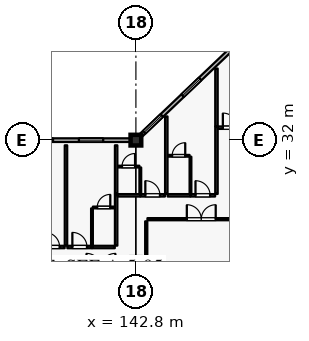
"""IFC4 building model, lengths in metres.
Left out: names, types, materials, properties, quantities, classifications, styles, units other than length and angle.
Written with IfcOpenShell. Run it as: python <this file> out.ifc"""

import sys

from ifc_helpers import new_model, si_unit, direction, frame, frame_2d, origin, origin_2d, place, context, subcontext, project, spatial, rectangle, extrude, element, fill, save


model = new_model("IFC4")
c1 = context("Model", 3, precision=1e-05, world=origin(), true_north=direction((0.0, 1.0)))
c2 = subcontext(c1, "Body", "Model", "MODEL_VIEW")
j1 = project(units=[si_unit("LENGTHUNIT", "METRE"), si_unit("PLANEANGLEUNIT", "RADIAN")], contexts=[c1])
p1 = place(None, origin())
s1 = spatial("IfcSite", under=j1, at=p1, CompositionType="ELEMENT")
p2 = place(p1, origin())
s2 = spatial("IfcBuilding", under=s1, at=p2, CompositionType="ELEMENT")
p3 = place(p2, frame((0.0, 0.0, 32.4)))
s3 = spatial("IfcBuildingStorey", under=s2, at=p3, CompositionType="ELEMENT", Elevation=32.4)
p4 = place(p3, frame((142.8, 32.0, 0.0), z_axis=(0.0, 0.0, 1.0), x_axis=(1.0, 0.0, 0.0)))
e1 = element("IfcColumn", 1, at=p4, inside=s3, PredefinedType="COLUMN", context=c2, shape_type="SweptSolid", body=[
    extrude(rectangle(XDim=0.7, YDim=0.7, at=origin_2d()), origin(), (0.0, 0.0, 1.0), 3.6),
])
p5 = place(p3, frame((142.8, 24.0, 0.0), z_axis=(0.0, 0.0, 1.0), x_axis=(1.0, 0.0, 0.0)))
e2 = element("IfcColumn", 2, at=p5, inside=s3, PredefinedType="COLUMN", context=c2, shape_type="SweptSolid", body=[
    extrude(rectangle(XDim=0.6, YDim=0.6, at=origin_2d()), origin(), (0.0, 0.0, 1.0), 3.6),
])
p6 = place(p3, frame((134.75, 32.0, 0.0), z_axis=(0.0, 0.0, 1.0), x_axis=(1.0, 0.0, 0.0)))
e3 = element("IfcWall", 3, at=p6, inside=s3, PredefinedType="SOLIDWALL", context=c2, shape_type="SweptSolid", body=[
    extrude(rectangle(XDim=7.7, YDim=0.24, at=frame_2d((3.85, 0.0))), origin(), (0.0, 0.0, 1.0), 2.94),
])
p7 = place(p6, frame((1.0, 0.0, 0.8)))
e4 = element("IfcOpeningElement", 4, at=p7, cuts=e3, PredefinedType="OPENING", context=c2, shape_type="SweptSolid", body=[
    extrude(rectangle(XDim=1.6, YDim=1.6, at=frame_2d((0.8, 0.8))), frame((0.0, 0.13, 0.0), z_axis=(0.0, -1.0, 0.0), x_axis=(1.0, 0.0, 0.0)), (0.0, 0.0, 1.0), 0.26),
])
p8 = place(p6, frame((4.3, 0.0, 0.8)))
e5 = element("IfcOpeningElement", 5, at=p8, cuts=e3, PredefinedType="OPENING", context=c2, shape_type="SweptSolid", body=[
    extrude(rectangle(XDim=1.6, YDim=1.6, at=frame_2d((0.8, 0.8))), frame((0.0, 0.13, 0.0), z_axis=(0.0, -1.0, 0.0), x_axis=(1.0, 0.0, 0.0)), (0.0, 0.0, 1.0), 0.26),
])
p9 = place(p3, frame((143.15, 32.333, 0.0), z_axis=(0.0, 0.0, 1.0), x_axis=(0.724116091282, 0.689678103427, 0.0)))
e6 = element("IfcWall", 6, at=p9, inside=s3, PredefinedType="SOLIDWALL", context=c2, shape_type="SweptSolid", body=[
    extrude(rectangle(XDim=10.634, YDim=0.24, at=frame_2d((5.317, 0.0))), origin(), (0.0, 0.0, 1.0), 2.94),
])
p10 = place(p9, frame((0.27, 0.0, 0.8)))
e7 = element("IfcOpeningElement", 7, at=p10, cuts=e6, PredefinedType="OPENING", context=c2, shape_type="SweptSolid", body=[
    extrude(rectangle(XDim=1.6, YDim=1.6, at=frame_2d((0.8, 0.8))), frame((0.0, 0.13, 0.0), z_axis=(0.0, -1.0, 0.0), x_axis=(1.0, 0.0, 0.0)), (0.0, 0.0, 1.0), 0.26),
])
p11 = place(p9, frame((3.757, 0.0, 0.8)))
e8 = element("IfcOpeningElement", 8, at=p11, cuts=e6, PredefinedType="OPENING", context=c2, shape_type="SweptSolid", body=[
    extrude(rectangle(XDim=1.6, YDim=1.6, at=frame_2d((0.8, 0.8))), frame((0.0, 0.13, 0.0), z_axis=(0.0, -1.0, 0.0), x_axis=(1.0, 0.0, 0.0)), (0.0, 0.0, 1.0), 0.26),
])
p12 = place(p9, frame((8.004, 0.0, 0.8)))
e9 = element("IfcOpeningElement", 9, at=p12, cuts=e6, PredefinedType="OPENING", context=c2, shape_type="SweptSolid", body=[
    extrude(rectangle(XDim=1.6, YDim=1.6, at=frame_2d((0.8, 0.8))), frame((0.0, 0.13, 0.0), z_axis=(0.0, -1.0, 0.0), x_axis=(1.0, 0.0, 0.0)), (0.0, 0.0, 1.0), 0.26),
])
p13 = place(p3, frame((136.49, 24.97, 0.0), z_axis=(0.0, 0.0, 1.0), x_axis=(1.0, 0.0, 0.0)))
e10 = element("IfcWall", 10, at=p13, inside=s3, PredefinedType="PARTITIONING", context=c2, shape_type="SweptSolid", body=[
    extrude(rectangle(XDim=1.62, YDim=0.16, at=frame_2d((0.81, 0.0))), origin(), (0.0, 0.0, 1.0), 3.335),
])
p14 = place(p13, frame((0.33, 0.0, 0.0)))
e11 = element("IfcOpeningElement", 11, at=p14, cuts=e10, PredefinedType="OPENING", context=c2, shape_type="SweptSolid", body=[
    extrude(rectangle(XDim=0.96, YDim=2.2, at=frame_2d((0.48, 1.1))), frame((0.0, 0.09, 0.0), z_axis=(0.0, -1.0, 0.0), x_axis=(1.0, 0.0, 0.0)), (0.0, 0.0, 1.0), 0.18),
])
p15 = place(p3, frame((138.29, 24.97, 0.0), z_axis=(0.0, 0.0, 1.0), x_axis=(1.0, 0.0, 0.0)))
e12 = element("IfcWall", 12, at=p15, inside=s3, PredefinedType="PARTITIONING", context=c2, shape_type="SweptSolid", body=[
    extrude(rectangle(XDim=1.62, YDim=0.16, at=frame_2d((0.81, 0.0))), origin(), (0.0, 0.0, 1.0), 3.335),
])
p16 = place(p15, frame((0.33, 0.0, 0.0)))
e13 = element("IfcOpeningElement", 13, at=p16, cuts=e12, PredefinedType="OPENING", context=c2, shape_type="SweptSolid", body=[
    extrude(rectangle(XDim=0.96, YDim=2.2, at=frame_2d((0.48, 1.1))), frame((0.0, 0.09, 0.0), z_axis=(0.0, -1.0, 0.0), x_axis=(1.0, 0.0, 0.0)), (0.0, 0.0, 1.0), 0.18),
])
p17 = place(p3, frame((139.92, 24.97, 0.0), z_axis=(0.0, 0.0, 1.0), x_axis=(1.0, 0.0, 0.0)))
e14 = element("IfcWall", 14, at=p17, inside=s3, PredefinedType="PARTITIONING", context=c2, shape_type="SweptSolid", body=[
    extrude(rectangle(XDim=1.49, YDim=0.16, at=frame_2d((0.745, 0.0))), origin(), (0.0, 0.0, 1.0), 3.335),
])
p18 = place(p3, frame((139.91, 25.06, 0.0), z_axis=(0.0, 0.0, 1.0), x_axis=(0.0, 1.0, 0.0)))
e15 = element("IfcWall", 15, at=p18, inside=s3, PredefinedType="PARTITIONING", context=c2, shape_type="SweptSolid", body=[
    extrude(rectangle(XDim=2.45, YDim=0.115, at=frame_2d((1.225, 0.0))), origin(), (0.0, 0.0, 1.0), 3.335),
])
p19 = place(p3, frame((139.97, 27.57, 0.0), z_axis=(0.0, 0.0, 1.0), x_axis=(1.0, 0.0, 0.0)))
e16 = element("IfcWall", 16, at=p19, inside=s3, PredefinedType="PARTITIONING", context=c2, shape_type="SweptSolid", body=[
    extrude(rectangle(XDim=1.43, YDim=0.115, at=frame_2d((0.715, 0.0))), origin(), (0.0, 0.0, 1.0), 3.335),
])
p20 = place(p19, frame((0.285, 0.0, 0.0)))
e17 = element("IfcOpeningElement", 17, at=p20, cuts=e16, PredefinedType="OPENING", context=c2, shape_type="SweptSolid", body=[
    extrude(rectangle(XDim=0.86, YDim=2.12, at=frame_2d((0.43, 1.06))), frame((0.0, 0.067, 0.0), z_axis=(0.0, -1.0, 0.0), x_axis=(1.0, 0.0, 0.0)), (0.0, 0.0, 1.0), 0.135),
])
p21 = place(p3, frame((138.2, 25.06, 0.0), z_axis=(0.0, 0.0, 1.0), x_axis=(0.0, 1.0, 0.0)))
e18 = element("IfcWall", 18, at=p21, inside=s3, PredefinedType="PARTITIONING", context=c2, shape_type="SweptSolid", body=[
    extrude(rectangle(XDim=6.6, YDim=0.16, at=frame_2d((3.3, 0.0))), origin(), (0.0, 0.0, 1.0), 3.335),
])
p22 = place(p3, frame((141.5, 25.06, 0.0), z_axis=(0.0, 0.0, 1.0), x_axis=(0.0, 1.0, 0.0)))
e19 = element("IfcWall", 19, at=p22, inside=s3, PredefinedType="PARTITIONING", context=c2, shape_type="SweptSolid", body=[
    extrude(rectangle(XDim=3.39, YDim=0.16, at=frame_2d((1.695, 0.0))), origin(), (0.0, 0.0, 1.0), 3.335),
])
p23 = place(p3, frame((141.59, 28.37, 0.0), z_axis=(0.0, 0.0, 1.0), x_axis=(1.0, 0.0, 0.0)))
e20 = element("IfcWall", 20, at=p23, inside=s3, PredefinedType="PARTITIONING", context=c2, shape_type="SweptSolid", body=[
    extrude(rectangle(XDim=1.49, YDim=0.16, at=frame_2d((0.745, 0.0))), origin(), (0.0, 0.0, 1.0), 3.335),
])
p24 = place(p3, frame((143.09, 28.37, 0.0), z_axis=(0.0, 0.0, 1.0), x_axis=(1.0, 0.0, 0.0)))
e21 = element("IfcWall", 21, at=p24, inside=s3, PredefinedType="PARTITIONING", context=c2, shape_type="SweptSolid", body=[
    extrude(rectangle(XDim=1.62, YDim=0.16, at=frame_2d((0.81, 0.0))), origin(), (0.0, 0.0, 1.0), 3.335),
])
p25 = place(p24, frame((0.33, 0.0, 0.0)))
e22 = element("IfcOpeningElement", 22, at=p25, cuts=e21, PredefinedType="OPENING", context=c2, shape_type="SweptSolid", body=[
    extrude(rectangle(XDim=0.96, YDim=2.2, at=frame_2d((0.48, 1.1))), frame((0.0, 0.09, 0.0), z_axis=(0.0, -1.0, 0.0), x_axis=(1.0, 0.0, 0.0)), (0.0, 0.0, 1.0), 0.18),
])
p26 = place(p3, frame((143.09, 28.46, 0.0), z_axis=(0.0, 0.0, 1.0), x_axis=(0.0, 1.0, 0.0)))
e23 = element("IfcWall", 23, at=p26, inside=s3, PredefinedType="PARTITIONING", context=c2, shape_type="SweptSolid", body=[
    extrude(rectangle(XDim=1.74, YDim=0.115, at=frame_2d((0.87, 0.0))), origin(), (0.0, 0.0, 1.0), 3.335),
])
p27 = place(p3, frame((141.6, 30.26, 0.0), z_axis=(0.0, 0.0, 1.0), x_axis=(1.0, 0.0, 0.0)))
e24 = element("IfcWall", 24, at=p27, inside=s3, PredefinedType="PARTITIONING", context=c2, shape_type="SweptSolid", body=[
    extrude(rectangle(XDim=1.43, YDim=0.115, at=frame_2d((0.715, 0.0))), origin(), (0.0, 0.0, 1.0), 3.335),
])
p28 = place(p27, frame((0.285, 0.0, 0.0)))
e25 = element("IfcOpeningElement", 25, at=p28, cuts=e24, PredefinedType="OPENING", context=c2, shape_type="SweptSolid", body=[
    extrude(rectangle(XDim=0.86, YDim=2.12, at=frame_2d((0.43, 1.06))), frame((0.0, 0.067, 0.0), z_axis=(0.0, -1.0, 0.0), x_axis=(1.0, 0.0, 0.0)), (0.0, 0.0, 1.0), 0.135),
])
p29 = place(p3, frame((141.5, 28.46, 0.0), z_axis=(0.0, 0.0, 1.0), x_axis=(0.0, 1.0, 0.0)))
e26 = element("IfcWall", 26, at=p29, inside=s3, PredefinedType="PARTITIONING", context=c2, shape_type="SweptSolid", body=[
    extrude(rectangle(XDim=3.2, YDim=0.16, at=frame_2d((1.6, 0.0))), origin(), (0.0, 0.0, 1.0), 3.335),
])
p30 = place(p3, frame((144.89, 28.37, 0.0), z_axis=(0.0, 0.0, 1.0), x_axis=(1.0, 0.0, 0.0)))
e27 = element("IfcWall", 27, at=p30, inside=s3, PredefinedType="PARTITIONING", context=c2, shape_type="SweptSolid", body=[
    extrude(rectangle(XDim=1.49, YDim=0.16, at=frame_2d((0.745, 0.0))), origin(), (0.0, 0.0, 1.0), 3.335),
])
p31 = place(p3, frame((146.39, 28.37, 0.0), z_axis=(0.0, 0.0, 1.0), x_axis=(1.0, 0.0, 0.0)))
e28 = element("IfcWall", 28, at=p31, inside=s3, PredefinedType="PARTITIONING", context=c2, shape_type="SweptSolid", body=[
    extrude(rectangle(XDim=1.62, YDim=0.16, at=frame_2d((0.81, 0.0))), origin(), (0.0, 0.0, 1.0), 3.335),
])
p32 = place(p31, frame((0.33, 0.0, 0.0)))
e29 = element("IfcOpeningElement", 29, at=p32, cuts=e28, PredefinedType="OPENING", context=c2, shape_type="SweptSolid", body=[
    extrude(rectangle(XDim=0.96, YDim=2.2, at=frame_2d((0.48, 1.1))), frame((0.0, 0.09, 0.0), z_axis=(0.0, -1.0, 0.0), x_axis=(1.0, 0.0, 0.0)), (0.0, 0.0, 1.0), 0.18),
])
p33 = place(p3, frame((146.39, 28.46, 0.0), z_axis=(0.0, 0.0, 1.0), x_axis=(0.0, 1.0, 0.0)))
e30 = element("IfcWall", 30, at=p33, inside=s3, PredefinedType="PARTITIONING", context=c2, shape_type="SweptSolid", body=[
    extrude(rectangle(XDim=2.45, YDim=0.115, at=frame_2d((1.225, 0.0))), origin(), (0.0, 0.0, 1.0), 3.335),
])
p34 = place(p3, frame((144.9, 30.97, 0.0), z_axis=(0.0, 0.0, 1.0), x_axis=(1.0, 0.0, 0.0)))
e31 = element("IfcWall", 31, at=p34, inside=s3, PredefinedType="PARTITIONING", context=c2, shape_type="SweptSolid", body=[
    extrude(rectangle(XDim=1.43, YDim=0.115, at=frame_2d((0.715, 0.0))), origin(), (0.0, 0.0, 1.0), 3.335),
])
p35 = place(p34, frame((0.285, 0.0, 0.0)))
e32 = element("IfcOpeningElement", 32, at=p35, cuts=e31, PredefinedType="OPENING", context=c2, shape_type="SweptSolid", body=[
    extrude(rectangle(XDim=0.86, YDim=2.12, at=frame_2d((0.43, 1.06))), frame((0.0, 0.067, 0.0), z_axis=(0.0, -1.0, 0.0), x_axis=(1.0, 0.0, 0.0)), (0.0, 0.0, 1.0), 0.135),
])
p36 = place(p3, frame((144.8, 28.46, 0.0), z_axis=(0.0, 0.0, 1.0), x_axis=(0.0, 1.0, 0.0)))
e33 = element("IfcWall", 33, at=p36, inside=s3, PredefinedType="PARTITIONING", context=c2, shape_type="SweptSolid", body=[
    extrude(rectangle(XDim=5.1, YDim=0.16, at=frame_2d((2.55, 0.0))), origin(), (0.0, 0.0, 1.0), 3.335),
])
p37 = place(p3, frame((148.1, 28.46, 0.0), z_axis=(0.0, 0.0, 1.0), x_axis=(0.0, 1.0, 0.0)))
e34 = element("IfcWall", 34, at=p37, inside=s3, PredefinedType="PARTITIONING", context=c2, shape_type="SweptSolid", body=[
    extrude(rectangle(XDim=4.44, YDim=0.16, at=frame_2d((2.22, 0.0))), origin(), (0.0, 0.0, 1.0), 3.335),
])
p38 = place(p3, frame((148.19, 32.82, 0.0), z_axis=(0.0, 0.0, 1.0), x_axis=(1.0, 0.0, 0.0)))
e35 = element("IfcWall", 35, at=p38, inside=s3, PredefinedType="PARTITIONING", context=c2, shape_type="SweptSolid", body=[
    extrude(rectangle(XDim=1.62, YDim=0.16, at=frame_2d((0.81, 0.0))), origin(), (0.0, 0.0, 1.0), 3.335),
])
p39 = place(p38, frame((0.33, 0.0, 0.0)))
e36 = element("IfcOpeningElement", 36, at=p39, cuts=e35, PredefinedType="OPENING", context=c2, shape_type="SweptSolid", body=[
    extrude(rectangle(XDim=0.96, YDim=2.2, at=frame_2d((0.48, 1.1))), frame((0.0, 0.09, 0.0), z_axis=(0.0, -1.0, 0.0), x_axis=(1.0, 0.0, 0.0)), (0.0, 0.0, 1.0), 0.18),
])
p40 = place(p3, frame((148.1, 32.91, 0.0), z_axis=(0.0, 0.0, 1.0), x_axis=(0.0, 1.0, 0.0)))
e37 = element("IfcWall", 37, at=p40, inside=s3, PredefinedType="PARTITIONING", context=c2, shape_type="SweptSolid", body=[
    extrude(rectangle(XDim=3.8, YDim=0.16, at=frame_2d((1.9, 0.0))), origin(), (0.0, 0.0, 1.0), 3.335),
])
p41 = place(p3, frame((143.56, 26.8, 0.0), z_axis=(0.0, 0.0, 1.0), x_axis=(1.0, 0.0, 0.0)))
e38 = element("IfcWall", 38, at=p41, inside=s3, PredefinedType="PARTITIONING", context=c2, shape_type="SweptSolid", body=[
    extrude(rectangle(XDim=7.08, YDim=0.14, at=frame_2d((3.54, 0.0))), origin(), (0.0, 0.0, 1.0), 3.335),
])
p42 = place(p41, frame((2.59, 0.0, 0.0)))
e39 = element("IfcOpeningElement", 39, at=p42, cuts=e38, PredefinedType="OPENING", context=c2, shape_type="SweptSolid", body=[
    extrude(rectangle(XDim=1.9, YDim=2.4, at=frame_2d((0.95, 1.2))), frame((0.0, 0.08, 0.0), z_axis=(0.0, -1.0, 0.0), x_axis=(1.0, 0.0, 0.0)), (0.0, 0.0, 1.0), 0.16),
])
p43 = place(p3, frame((143.48, 23.45, 0.0), z_axis=(0.0, 0.0, 1.0), x_axis=(0.0, 1.0, 0.0)))
e40 = element("IfcWall", 40, at=p43, inside=s3, PredefinedType="PARTITIONING", context=c2, shape_type="SweptSolid", body=[
    extrude(rectangle(XDim=3.21, YDim=0.14, at=frame_2d((1.605, 0.0))), origin(), (0.0, 0.0, 1.0), 3.335),
])
p44 = place(p7, origin())
e41 = element("IfcWindow", 41, at=p44, inside=s3, PartitioningType="SINGLE_PANEL", PredefinedType="WINDOW", context=c2, shape_type="SweptSolid", body=[
    extrude(rectangle(XDim=1.6, YDim=1.6, at=frame_2d((0.8, 0.8))), frame((0.0, 0.03, 0.0), z_axis=(0.0, -1.0, 0.0), x_axis=(1.0, 0.0, 0.0)), (0.0, 0.0, 1.0), 0.06),
])
fill(e4, e41)
p45 = place(p8, origin())
e42 = element("IfcWindow", 42, at=p45, inside=s3, PartitioningType="SINGLE_PANEL", PredefinedType="WINDOW", context=c2, shape_type="SweptSolid", body=[
    extrude(rectangle(XDim=1.6, YDim=1.6, at=frame_2d((0.8, 0.8))), frame((0.0, 0.03, 0.0), z_axis=(0.0, -1.0, 0.0), x_axis=(1.0, 0.0, 0.0)), (0.0, 0.0, 1.0), 0.06),
])
fill(e5, e42)
p46 = place(p10, origin())
e43 = element("IfcWindow", 43, at=p46, inside=s3, PartitioningType="SINGLE_PANEL", PredefinedType="WINDOW", context=c2, shape_type="SweptSolid", body=[
    extrude(rectangle(XDim=1.6, YDim=1.6, at=frame_2d((0.8, 0.8))), frame((0.0, 0.03, 0.0), z_axis=(0.0, -1.0, 0.0), x_axis=(1.0, 0.0, 0.0)), (0.0, 0.0, 1.0), 0.06),
])
fill(e7, e43)
p47 = place(p11, origin())
e44 = element("IfcWindow", 44, at=p47, inside=s3, PartitioningType="SINGLE_PANEL", PredefinedType="WINDOW", context=c2, shape_type="SweptSolid", body=[
    extrude(rectangle(XDim=1.6, YDim=1.6, at=frame_2d((0.8, 0.8))), frame((0.0, 0.03, 0.0), z_axis=(0.0, -1.0, 0.0), x_axis=(1.0, 0.0, 0.0)), (0.0, 0.0, 1.0), 0.06),
])
fill(e8, e44)
p48 = place(p14, origin())
e45 = element("IfcDoor", 45, at=p48, inside=s3, OperationType="SINGLE_SWING_LEFT", PredefinedType="DOOR", context=c2, shape_type="SweptSolid", body=[
    extrude(rectangle(XDim=0.96, YDim=2.2, at=frame_2d((0.48, 1.1))), frame((0.0, 0.025, 0.0), z_axis=(0.0, -1.0, 0.0), x_axis=(1.0, 0.0, 0.0)), (0.0, 0.0, 1.0), 0.05),
])
fill(e11, e45)
p49 = place(p16, origin())
e46 = element("IfcDoor", 46, at=p49, inside=s3, OperationType="SINGLE_SWING_LEFT", PredefinedType="DOOR", context=c2, shape_type="SweptSolid", body=[
    extrude(rectangle(XDim=0.96, YDim=2.2, at=frame_2d((0.48, 1.1))), frame((0.0, 0.025, 0.0), z_axis=(0.0, -1.0, 0.0), x_axis=(1.0, 0.0, 0.0)), (0.0, 0.0, 1.0), 0.05),
])
fill(e13, e46)
p50 = place(p20, origin())
e47 = element("IfcDoor", 47, at=p50, inside=s3, OperationType="SINGLE_SWING_RIGHT", PredefinedType="DOOR", context=c2, shape_type="SweptSolid", body=[
    extrude(rectangle(XDim=0.86, YDim=2.12, at=frame_2d((0.43, 1.06))), frame((0.0, 0.025, 0.0), z_axis=(0.0, -1.0, 0.0), x_axis=(1.0, 0.0, 0.0)), (0.0, 0.0, 1.0), 0.05),
])
fill(e17, e47)
p51 = place(p25, origin())
e48 = element("IfcDoor", 48, at=p51, inside=s3, OperationType="SINGLE_SWING_LEFT", PredefinedType="DOOR", context=c2, shape_type="SweptSolid", body=[
    extrude(rectangle(XDim=0.96, YDim=2.2, at=frame_2d((0.48, 1.1))), frame((0.0, 0.025, 0.0), z_axis=(0.0, -1.0, 0.0), x_axis=(1.0, 0.0, 0.0)), (0.0, 0.0, 1.0), 0.05),
])
fill(e22, e48)
p52 = place(p28, origin())
e49 = element("IfcDoor", 49, at=p52, inside=s3, OperationType="SINGLE_SWING_RIGHT", PredefinedType="DOOR", context=c2, shape_type="SweptSolid", body=[
    extrude(rectangle(XDim=0.86, YDim=2.12, at=frame_2d((0.43, 1.06))), frame((0.0, 0.025, 0.0), z_axis=(0.0, -1.0, 0.0), x_axis=(1.0, 0.0, 0.0)), (0.0, 0.0, 1.0), 0.05),
])
fill(e25, e49)
p53 = place(p32, origin())
e50 = element("IfcDoor", 50, at=p53, inside=s3, OperationType="SINGLE_SWING_LEFT", PredefinedType="DOOR", context=c2, shape_type="SweptSolid", body=[
    extrude(rectangle(XDim=0.96, YDim=2.2, at=frame_2d((0.48, 1.1))), frame((0.0, 0.025, 0.0), z_axis=(0.0, -1.0, 0.0), x_axis=(1.0, 0.0, 0.0)), (0.0, 0.0, 1.0), 0.05),
])
fill(e29, e50)
p54 = place(p35, origin())
e51 = element("IfcDoor", 51, at=p54, inside=s3, OperationType="SINGLE_SWING_RIGHT", PredefinedType="DOOR", context=c2, shape_type="SweptSolid", body=[
    extrude(rectangle(XDim=0.86, YDim=2.12, at=frame_2d((0.43, 1.06))), frame((0.0, 0.025, 0.0), z_axis=(0.0, -1.0, 0.0), x_axis=(1.0, 0.0, 0.0)), (0.0, 0.0, 1.0), 0.05),
])
fill(e32, e51)
p55 = place(p39, origin())
e52 = element("IfcDoor", 52, at=p55, inside=s3, OperationType="SINGLE_SWING_LEFT", PredefinedType="DOOR", context=c2, shape_type="SweptSolid", body=[
    extrude(rectangle(XDim=0.96, YDim=2.2, at=frame_2d((0.48, 1.1))), frame((0.0, 0.025, 0.0), z_axis=(0.0, -1.0, 0.0), x_axis=(1.0, 0.0, 0.0)), (0.0, 0.0, 1.0), 0.05),
])
fill(e36, e52)
p56 = place(p42, origin())
e53 = element("IfcDoor", 53, at=p56, inside=s3, OperationType="DOUBLE_DOOR_SINGLE_SWING", PredefinedType="DOOR", context=c2, shape_type="SweptSolid", body=[
    extrude(rectangle(XDim=1.9, YDim=2.4, at=frame_2d((0.95, 1.2))), frame((0.0, 0.025, 0.0), z_axis=(0.0, -1.0, 0.0), x_axis=(1.0, 0.0, 0.0)), (0.0, 0.0, 1.0), 0.05),
])
fill(e39, e53)
save(model, sys.argv[1])
